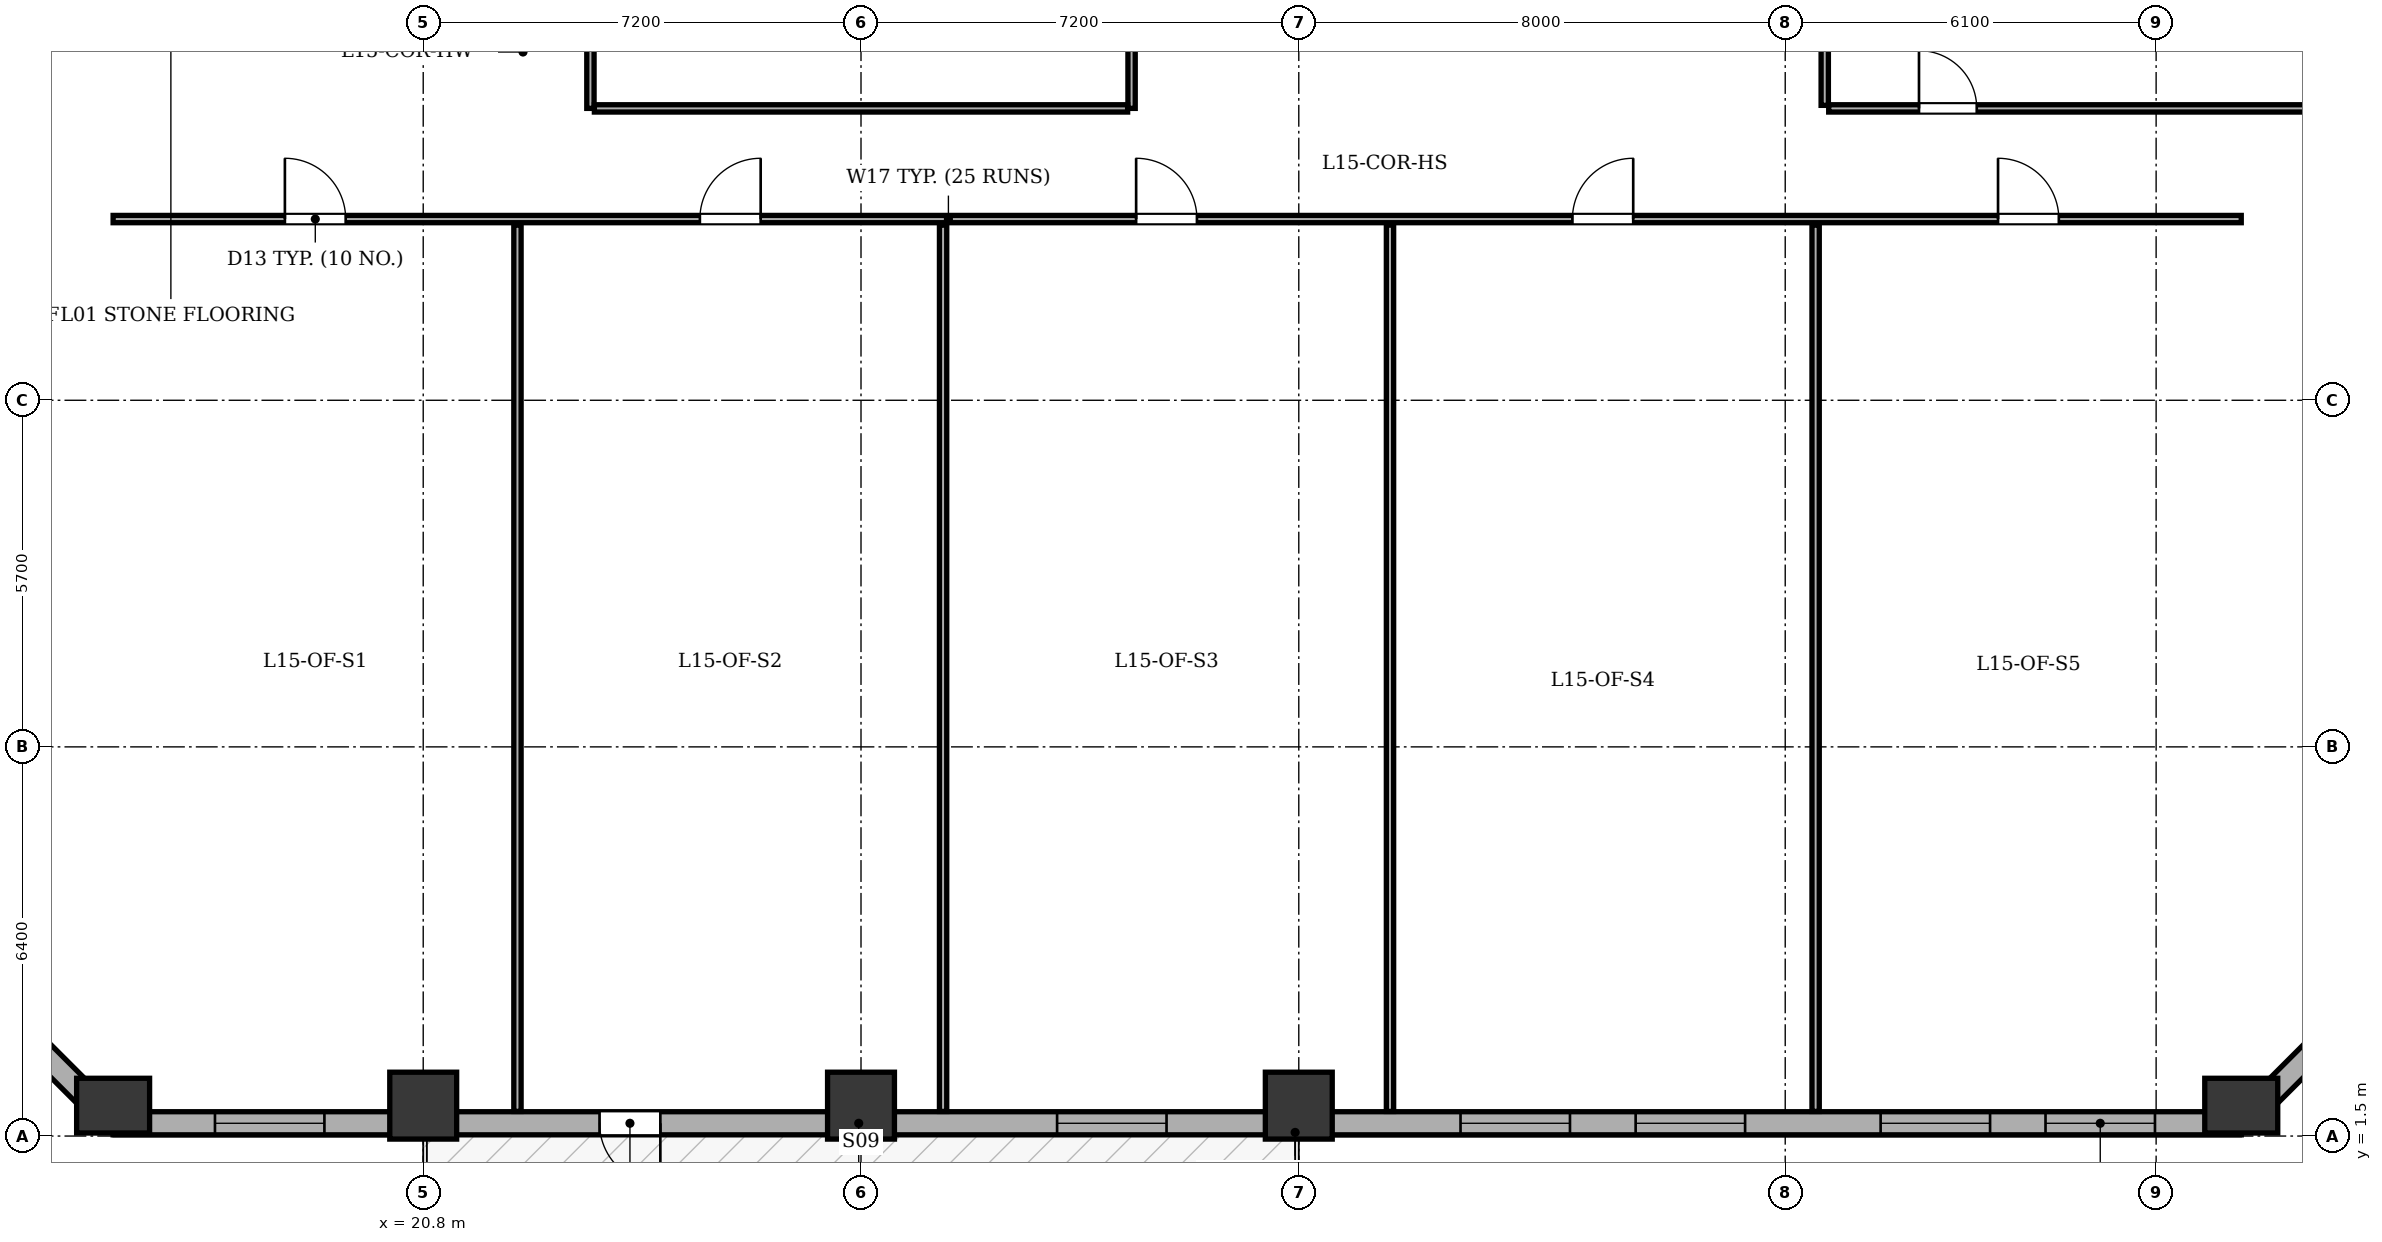
"""IFC4 building model, lengths in metres.
Left out: names, types, materials, properties, quantities, classifications, styles, units other than length and angle.
Written with IfcOpenShell. Run it as: python <this file> out.ifc"""

import sys

from ifc_helpers import new_model, si_unit, direction, frame, frame_2d, origin, origin_2d, place, context, subcontext, project, spatial, rectangle, extrude, element, fill, save


model = new_model("IFC4")
c1 = context("Model", 3, precision=1e-05, world=origin(), true_north=direction((0.0, 1.0)))
c2 = subcontext(c1, "Body", "Model", "MODEL_VIEW")
j1 = project(units=[si_unit("LENGTHUNIT", "METRE"), si_unit("PLANEANGLEUNIT", "RADIAN")], contexts=[c1])
p1 = place(None, origin())
s1 = spatial("IfcSite", under=j1, at=p1, CompositionType="ELEMENT")
p2 = place(p1, origin())
s2 = spatial("IfcBuilding", under=s1, at=p2, CompositionType="ELEMENT")
p3 = place(p2, frame((0.0, 0.0, 63.3)))
s3 = spatial("IfcBuildingStorey", under=s2, at=p3, CompositionType="ELEMENT", Elevation=63.3)
p4 = place(p3, frame((15.7, 2.0, 0.0), z_axis=(0.0, 0.0, 1.0), x_axis=(1.0, 0.0, 0.0)))
e1 = element("IfcColumn", 1, at=p4, inside=s3, PredefinedType="COLUMN", context=c2, shape_type="SweptSolid", body=[
    extrude(rectangle(XDim=0.9, YDim=1.2, at=origin_2d()), origin(), (0.0, 0.0, 1.0), 3.9),
])
for number, where, z_axis, x_axis in (
    (2, (20.8, 2.0, 0.0), (0.0, 0.0, 1.0), (1.0, 0.0, 0.0)),
    (3, (28.0, 2.0, 0.0), (0.0, 0.0, 1.0), (1.0, 0.0, 0.0)),
    (4, (35.2, 2.0, 0.0), (0.0, 0.0, 1.0), (1.0, 0.0, 0.0)),
):
    element("IfcColumn", number, at=place(p3, frame(where, z_axis=z_axis, x_axis=x_axis)), inside=s3, PredefinedType="COLUMN", context=c2, shape_type="SweptSolid", body=[
        extrude(rectangle(XDim=1.1, YDim=1.1, at=origin_2d()), origin(), (0.0, 0.0, 1.0), 3.9),
    ])
p5 = place(p3, frame((50.7, 2.0, 0.0), z_axis=(0.0, 0.0, 1.0), x_axis=(1.0, 0.0, 0.0)))
e5 = element("IfcColumn", 5, at=p5, inside=s3, PredefinedType="COLUMN", context=c2, shape_type="SweptSolid", body=[
    extrude(rectangle(XDim=0.9, YDim=1.2, at=origin_2d()), origin(), (0.0, 0.0, 1.0), 3.9),
])
p6 = place(p3, frame((50.7, 1.71, 0.0), z_axis=(0.0, 0.0, 1.0), x_axis=(-1.0, 0.0, 0.0)))
e6 = element("IfcWall", 6, at=p6, inside=s3, PredefinedType="STANDARD", context=c2, shape_type="SweptSolid", body=[
    extrude(rectangle(XDim=35.0, YDim=0.38, at=frame_2d((17.5, 0.0))), origin(), (0.0, 0.0, 1.0), 3.135),
])
p7 = place(p6, frame((26.0, 0.0, 0.0)))
e7 = element("IfcOpeningElement", 7, at=p7, cuts=e6, PredefinedType="OPENING", context=c2, shape_type="SweptSolid", body=[
    extrude(rectangle(XDim=1.0, YDim=2.02, at=frame_2d((0.5, 1.01))), frame((0.0, 0.2, 0.0), z_axis=(0.0, -1.0, 0.0), x_axis=(1.0, 0.0, 0.0)), (0.0, 0.0, 1.0), 0.4),
])
p8 = place(p6, frame((1.419, 0.0, 0.8)))
e8 = element("IfcOpeningElement", 8, at=p8, cuts=e6, PredefinedType="OPENING", context=c2, shape_type="SweptSolid", body=[
    extrude(rectangle(XDim=1.8, YDim=1.9, at=frame_2d((0.9, 0.95))), frame((0.0, 0.2, 0.0), z_axis=(0.0, -1.0, 0.0), x_axis=(1.0, 0.0, 0.0)), (0.0, 0.0, 1.0), 0.4),
])
p9 = place(p6, frame((4.131, 0.0, 0.8)))
e9 = element("IfcOpeningElement", 9, at=p9, cuts=e6, PredefinedType="OPENING", context=c2, shape_type="SweptSolid", body=[
    extrude(rectangle(XDim=1.8, YDim=1.9, at=frame_2d((0.9, 0.95))), frame((0.0, 0.2, 0.0), z_axis=(0.0, -1.0, 0.0), x_axis=(1.0, 0.0, 0.0)), (0.0, 0.0, 1.0), 0.4),
])
p10 = place(p6, frame((8.16, 0.0, 0.8)))
e10 = element("IfcOpeningElement", 10, at=p10, cuts=e6, PredefinedType="OPENING", context=c2, shape_type="SweptSolid", body=[
    extrude(rectangle(XDim=1.8, YDim=1.9, at=frame_2d((0.9, 0.95))), frame((0.0, 0.2, 0.0), z_axis=(0.0, -1.0, 0.0), x_axis=(1.0, 0.0, 0.0)), (0.0, 0.0, 1.0), 0.4),
])
p11 = place(p6, frame((11.04, 0.0, 0.8)))
e11 = element("IfcOpeningElement", 11, at=p11, cuts=e6, PredefinedType="OPENING", context=c2, shape_type="SweptSolid", body=[
    extrude(rectangle(XDim=1.8, YDim=1.9, at=frame_2d((0.9, 0.95))), frame((0.0, 0.2, 0.0), z_axis=(0.0, -1.0, 0.0), x_axis=(1.0, 0.0, 0.0)), (0.0, 0.0, 1.0), 0.4),
])
p12 = place(p6, frame((17.675, 0.0, 0.8)))
e12 = element("IfcOpeningElement", 12, at=p12, cuts=e6, PredefinedType="OPENING", context=c2, shape_type="SweptSolid", body=[
    extrude(rectangle(XDim=1.8, YDim=1.9, at=frame_2d((0.9, 0.95))), frame((0.0, 0.2, 0.0), z_axis=(0.0, -1.0, 0.0), x_axis=(1.0, 0.0, 0.0)), (0.0, 0.0, 1.0), 0.4),
])
p13 = place(p6, frame((31.525, 0.0, 0.8)))
e13 = element("IfcOpeningElement", 13, at=p13, cuts=e6, PredefinedType="OPENING", context=c2, shape_type="SweptSolid", body=[
    extrude(rectangle(XDim=1.8, YDim=1.9, at=frame_2d((0.9, 0.95))), frame((0.0, 0.2, 0.0), z_axis=(0.0, -1.0, 0.0), x_axis=(1.0, 0.0, 0.0)), (0.0, 0.0, 1.0), 0.4),
])
p14 = place(p3, frame((15.7, 1.71, 0.0), z_axis=(0.0, 0.0, 1.0), x_axis=(-0.707106781187, 0.707106781187, 0.0)))
e14 = element("IfcWall", 14, at=p14, inside=s3, PredefinedType="STANDARD", context=c2, shape_type="SweptSolid", body=[
    extrude(rectangle(XDim=6.774, YDim=0.38, at=frame_2d((3.387, 0.0))), origin(), (0.0, 0.0, 1.0), 3.135),
])
p15 = place(p14, frame((2.687, 0.0, 0.8)))
e15 = element("IfcOpeningElement", 15, at=p15, cuts=e14, PredefinedType="OPENING", context=c2, shape_type="SweptSolid", body=[
    extrude(rectangle(XDim=1.4, YDim=1.65, at=frame_2d((0.7, 0.825))), frame((0.0, 0.2, 0.0), z_axis=(0.0, -1.0, 0.0), x_axis=(1.0, 0.0, 0.0)), (0.0, 0.0, 1.0), 0.4),
])
p16 = place(p3, frame((55.49, 6.5, 0.0), z_axis=(0.0, 0.0, 1.0), x_axis=(-0.707106781187, -0.707106781187, 0.0)))
e16 = element("IfcWall", 16, at=p16, inside=s3, PredefinedType="STANDARD", context=c2, shape_type="SweptSolid", body=[
    extrude(rectangle(XDim=6.774, YDim=0.38, at=frame_2d((3.387, 0.0))), origin(), (0.0, 0.0, 1.0), 3.135),
])
p17 = place(p16, frame((2.687, 0.0, 0.8)))
e17 = element("IfcOpeningElement", 17, at=p17, cuts=e16, PredefinedType="OPENING", context=c2, shape_type="SweptSolid", body=[
    extrude(rectangle(XDim=1.4, YDim=1.65, at=frame_2d((0.7, 0.825))), frame((0.0, 0.2, 0.0), z_axis=(0.0, -1.0, 0.0), x_axis=(1.0, 0.0, 0.0)), (0.0, 0.0, 1.0), 0.4),
])
for number, where, z_axis, x_axis in (
    (18, (23.55, 18.4, 0.0), (0.0, 0.0, 1.0), (0.0, 1.0, 0.0)),
    (19, (32.45, 18.4, 0.0), (0.0, 0.0, 1.0), (0.0, 1.0, 0.0)),
):
    element("IfcWall", number, at=place(p3, frame(where, z_axis=z_axis, x_axis=x_axis)), inside=s3, PredefinedType="PARTITIONING", context=c2, shape_type="SweptSolid", body=[
        extrude(rectangle(XDim=3.485, YDim=0.12, at=frame_2d((1.743, 0.0))), origin(), (0.0, 0.0, 1.0), 3.6),
    ])
p18 = place(p3, frame((23.615, 18.4, 0.0), z_axis=(0.0, 0.0, 1.0), x_axis=(1.0, 0.0, 0.0)))
e20 = element("IfcWall", 20, at=p18, inside=s3, PredefinedType="PARTITIONING", context=c2, shape_type="SweptSolid", body=[
    extrude(rectangle(XDim=8.77, YDim=0.12, at=frame_2d((4.385, 0.0))), origin(), (0.0, 0.0, 1.0), 3.6),
])
p19 = place(p3, frame((15.7, 16.58, 0.0), z_axis=(0.0, 0.0, 1.0), x_axis=(1.0, 0.0, 0.0)))
e21 = element("IfcWall", 21, at=p19, inside=s3, PredefinedType="PARTITIONING", context=c2, shape_type="SweptSolid", body=[
    extrude(rectangle(XDim=35.0, YDim=0.12, at=frame_2d((17.5, 0.0))), origin(), (0.0, 0.0, 1.0), 3.6),
])
p20 = place(p19, frame((2.825, 0.0, 0.0)))
e22 = element("IfcOpeningElement", 22, at=p20, cuts=e21, PredefinedType="OPENING", context=c2, shape_type="SweptSolid", body=[
    extrude(rectangle(XDim=1.0, YDim=2.1, at=frame_2d((0.5, 1.05))), frame((0.0, 0.07, 0.0), z_axis=(0.0, -1.0, 0.0), x_axis=(1.0, 0.0, 0.0)), (0.0, 0.0, 1.0), 0.14),
])
p21 = place(p19, frame((9.65, 0.0, 0.0)))
e23 = element("IfcOpeningElement", 23, at=p21, cuts=e21, PredefinedType="OPENING", context=c2, shape_type="SweptSolid", body=[
    extrude(rectangle(XDim=1.0, YDim=2.1, at=frame_2d((0.5, 1.05))), frame((0.0, 0.07, 0.0), z_axis=(0.0, -1.0, 0.0), x_axis=(1.0, 0.0, 0.0)), (0.0, 0.0, 1.0), 0.14),
])
p22 = place(p19, frame((16.825, 0.0, 0.0)))
e24 = element("IfcOpeningElement", 24, at=p22, cuts=e21, PredefinedType="OPENING", context=c2, shape_type="SweptSolid", body=[
    extrude(rectangle(XDim=1.0, YDim=2.1, at=frame_2d((0.5, 1.05))), frame((0.0, 0.07, 0.0), z_axis=(0.0, -1.0, 0.0), x_axis=(1.0, 0.0, 0.0)), (0.0, 0.0, 1.0), 0.14),
])
p23 = place(p19, frame((24.0, 0.0, 0.0)))
e25 = element("IfcOpeningElement", 25, at=p23, cuts=e21, PredefinedType="OPENING", context=c2, shape_type="SweptSolid", body=[
    extrude(rectangle(XDim=1.0, YDim=2.1, at=frame_2d((0.5, 1.05))), frame((0.0, 0.07, 0.0), z_axis=(0.0, -1.0, 0.0), x_axis=(1.0, 0.0, 0.0)), (0.0, 0.0, 1.0), 0.14),
])
p24 = place(p19, frame((31.0, 0.0, 0.0)))
e26 = element("IfcOpeningElement", 26, at=p24, cuts=e21, PredefinedType="OPENING", context=c2, shape_type="SweptSolid", body=[
    extrude(rectangle(XDim=1.0, YDim=2.1, at=frame_2d((0.5, 1.05))), frame((0.0, 0.07, 0.0), z_axis=(0.0, -1.0, 0.0), x_axis=(1.0, 0.0, 0.0)), (0.0, 0.0, 1.0), 0.14),
])
p25 = place(p3, frame((22.35, 1.905, 0.0), z_axis=(0.0, 0.0, 1.0), x_axis=(0.0, 1.0, 0.0)))
e27 = element("IfcWall", 27, at=p25, inside=s3, PredefinedType="PARTITIONING", context=c2, shape_type="SweptSolid", body=[
    extrude(rectangle(XDim=14.575, YDim=0.12, at=frame_2d((7.288, 0.0))), origin(), (0.0, 0.0, 1.0), 3.135),
])
for number, where, z_axis, x_axis in (
    (28, (29.35, 1.905, 0.0), (0.0, 0.0, 1.0), (0.0, 1.0, 0.0)),
    (29, (36.7, 1.905, 0.0), (0.0, 0.0, 1.0), (0.0, 1.0, 0.0)),
    (30, (43.7, 1.905, 0.0), (0.0, 0.0, 1.0), (0.0, 1.0, 0.0)),
):
    element("IfcWall", number, at=place(p3, frame(where, z_axis=z_axis, x_axis=x_axis)), inside=s3, PredefinedType="PARTITIONING", context=c2, shape_type="SweptSolid", body=[
        extrude(rectangle(XDim=14.575, YDim=0.12, at=frame_2d((7.288, 0.0))), origin(), (0.0, 0.0, 1.0), 3.6),
    ])
p26 = place(p3, frame((43.85, 18.45, 0.0), z_axis=(0.0, 0.0, 1.0), x_axis=(0.0, 1.0, 0.0)))
e31 = element("IfcWall", 31, at=p26, inside=s3, PredefinedType="PARTITIONING", context=c2, shape_type="SweptSolid", body=[
    extrude(rectangle(XDim=17.5, YDim=0.12, at=frame_2d((8.75, 0.0))), origin(), (0.0, 0.0, 1.0), 3.6),
])
p27 = place(p3, frame((43.915, 18.4, 0.0), z_axis=(0.0, 0.0, 1.0), x_axis=(1.0, 0.0, 0.0)))
e32 = element("IfcWall", 32, at=p27, inside=s3, PredefinedType="PARTITIONING", context=c2, shape_type="SweptSolid", body=[
    extrude(rectangle(XDim=11.38, YDim=0.12, at=frame_2d((5.69, 0.0))), origin(), (0.0, 0.0, 1.0), 3.6),
])
p28 = place(p27, frame((1.485, 0.0, 0.0)))
e33 = element("IfcOpeningElement", 33, at=p28, cuts=e32, PredefinedType="OPENING", context=c2, shape_type="SweptSolid", body=[
    extrude(rectangle(XDim=0.95, YDim=2.1, at=frame_2d((0.475, 1.05))), frame((0.0, 0.07, 0.0), z_axis=(0.0, -1.0, 0.0), x_axis=(1.0, 0.0, 0.0)), (0.0, 0.0, 1.0), 0.14),
])
p29 = place(p7, origin())
e34 = element("IfcDoor", 34, at=p29, inside=s3, OperationType="SINGLE_SWING_LEFT", PredefinedType="DOOR", context=c2, shape_type="SweptSolid", body=[
    extrude(rectangle(XDim=1.0, YDim=2.02, at=frame_2d((0.5, 1.01))), frame((0.0, 0.025, 0.0), z_axis=(0.0, -1.0, 0.0), x_axis=(1.0, 0.0, 0.0)), (0.0, 0.0, 1.0), 0.05),
])
fill(e7, e34)
p30 = place(p8, origin())
e35 = element("IfcWindow", 35, at=p30, inside=s3, PartitioningType="SINGLE_PANEL", PredefinedType="WINDOW", context=c2, shape_type="SweptSolid", body=[
    extrude(rectangle(XDim=1.8, YDim=1.9, at=frame_2d((0.9, 0.95))), frame((0.0, -0.01, 0.0), z_axis=(0.0, -1.0, 0.0), x_axis=(1.0, 0.0, 0.0)), (0.0, 0.0, 1.0), 0.06),
])
fill(e8, e35)
p31 = place(p9, origin())
e36 = element("IfcWindow", 36, at=p31, inside=s3, PartitioningType="SINGLE_PANEL", PredefinedType="WINDOW", context=c2, shape_type="SweptSolid", body=[
    extrude(rectangle(XDim=1.8, YDim=1.9, at=frame_2d((0.9, 0.95))), frame((0.0, -0.01, 0.0), z_axis=(0.0, -1.0, 0.0), x_axis=(1.0, 0.0, 0.0)), (0.0, 0.0, 1.0), 0.06),
])
fill(e9, e36)
p32 = place(p10, origin())
e37 = element("IfcWindow", 37, at=p32, inside=s3, PartitioningType="SINGLE_PANEL", PredefinedType="WINDOW", context=c2, shape_type="SweptSolid", body=[
    extrude(rectangle(XDim=1.8, YDim=1.9, at=frame_2d((0.9, 0.95))), frame((0.0, -0.01, 0.0), z_axis=(0.0, -1.0, 0.0), x_axis=(1.0, 0.0, 0.0)), (0.0, 0.0, 1.0), 0.06),
])
fill(e10, e37)
p33 = place(p11, origin())
e38 = element("IfcWindow", 38, at=p33, inside=s3, PartitioningType="SINGLE_PANEL", PredefinedType="WINDOW", context=c2, shape_type="SweptSolid", body=[
    extrude(rectangle(XDim=1.8, YDim=1.9, at=frame_2d((0.9, 0.95))), frame((0.0, -0.01, 0.0), z_axis=(0.0, -1.0, 0.0), x_axis=(1.0, 0.0, 0.0)), (0.0, 0.0, 1.0), 0.06),
])
fill(e11, e38)
p34 = place(p12, origin())
e39 = element("IfcWindow", 39, at=p34, inside=s3, PartitioningType="SINGLE_PANEL", PredefinedType="WINDOW", context=c2, shape_type="SweptSolid", body=[
    extrude(rectangle(XDim=1.8, YDim=1.9, at=frame_2d((0.9, 0.95))), frame((0.0, -0.01, 0.0), z_axis=(0.0, -1.0, 0.0), x_axis=(1.0, 0.0, 0.0)), (0.0, 0.0, 1.0), 0.06),
])
fill(e12, e39)
p35 = place(p13, origin())
e40 = element("IfcWindow", 40, at=p35, inside=s3, PartitioningType="SINGLE_PANEL", PredefinedType="WINDOW", context=c2, shape_type="SweptSolid", body=[
    extrude(rectangle(XDim=1.8, YDim=1.9, at=frame_2d((0.9, 0.95))), frame((0.0, -0.01, 0.0), z_axis=(0.0, -1.0, 0.0), x_axis=(1.0, 0.0, 0.0)), (0.0, 0.0, 1.0), 0.06),
])
fill(e13, e40)
p36 = place(p20, origin())
e41 = element("IfcDoor", 41, at=p36, inside=s3, OperationType="SINGLE_SWING_LEFT", PredefinedType="DOOR", context=c2, shape_type="SweptSolid", body=[
    extrude(rectangle(XDim=1.0, YDim=2.1, at=frame_2d((0.5, 1.05))), frame((0.0, 0.025, 0.0), z_axis=(0.0, -1.0, 0.0), x_axis=(1.0, 0.0, 0.0)), (0.0, 0.0, 1.0), 0.05),
])
fill(e22, e41)
p37 = place(p21, origin())
e42 = element("IfcDoor", 42, at=p37, inside=s3, OperationType="SINGLE_SWING_RIGHT", PredefinedType="DOOR", context=c2, shape_type="SweptSolid", body=[
    extrude(rectangle(XDim=1.0, YDim=2.1, at=frame_2d((0.5, 1.05))), frame((0.0, 0.025, 0.0), z_axis=(0.0, -1.0, 0.0), x_axis=(1.0, 0.0, 0.0)), (0.0, 0.0, 1.0), 0.05),
])
fill(e23, e42)
p38 = place(p22, origin())
e43 = element("IfcDoor", 43, at=p38, inside=s3, OperationType="SINGLE_SWING_LEFT", PredefinedType="DOOR", context=c2, shape_type="SweptSolid", body=[
    extrude(rectangle(XDim=1.0, YDim=2.1, at=frame_2d((0.5, 1.05))), frame((0.0, 0.025, 0.0), z_axis=(0.0, -1.0, 0.0), x_axis=(1.0, 0.0, 0.0)), (0.0, 0.0, 1.0), 0.05),
])
fill(e24, e43)
p39 = place(p23, origin())
e44 = element("IfcDoor", 44, at=p39, inside=s3, OperationType="SINGLE_SWING_RIGHT", PredefinedType="DOOR", context=c2, shape_type="SweptSolid", body=[
    extrude(rectangle(XDim=1.0, YDim=2.1, at=frame_2d((0.5, 1.05))), frame((0.0, 0.025, 0.0), z_axis=(0.0, -1.0, 0.0), x_axis=(1.0, 0.0, 0.0)), (0.0, 0.0, 1.0), 0.05),
])
fill(e25, e44)
p40 = place(p24, origin())
e45 = element("IfcDoor", 45, at=p40, inside=s3, OperationType="SINGLE_SWING_LEFT", PredefinedType="DOOR", context=c2, shape_type="SweptSolid", body=[
    extrude(rectangle(XDim=1.0, YDim=2.1, at=frame_2d((0.5, 1.05))), frame((0.0, 0.025, 0.0), z_axis=(0.0, -1.0, 0.0), x_axis=(1.0, 0.0, 0.0)), (0.0, 0.0, 1.0), 0.05),
])
fill(e26, e45)
p41 = place(p28, origin())
e46 = element("IfcDoor", 46, at=p41, inside=s3, OperationType="SINGLE_SWING_LEFT", PredefinedType="DOOR", context=c2, shape_type="SweptSolid", body=[
    extrude(rectangle(XDim=0.95, YDim=2.1, at=frame_2d((0.475, 1.05))), frame((0.0, 0.025, 0.0), z_axis=(0.0, -1.0, 0.0), x_axis=(1.0, 0.0, 0.0)), (0.0, 0.0, 1.0), 0.05),
])
fill(e33, e46)
save(model, sys.argv[1])
